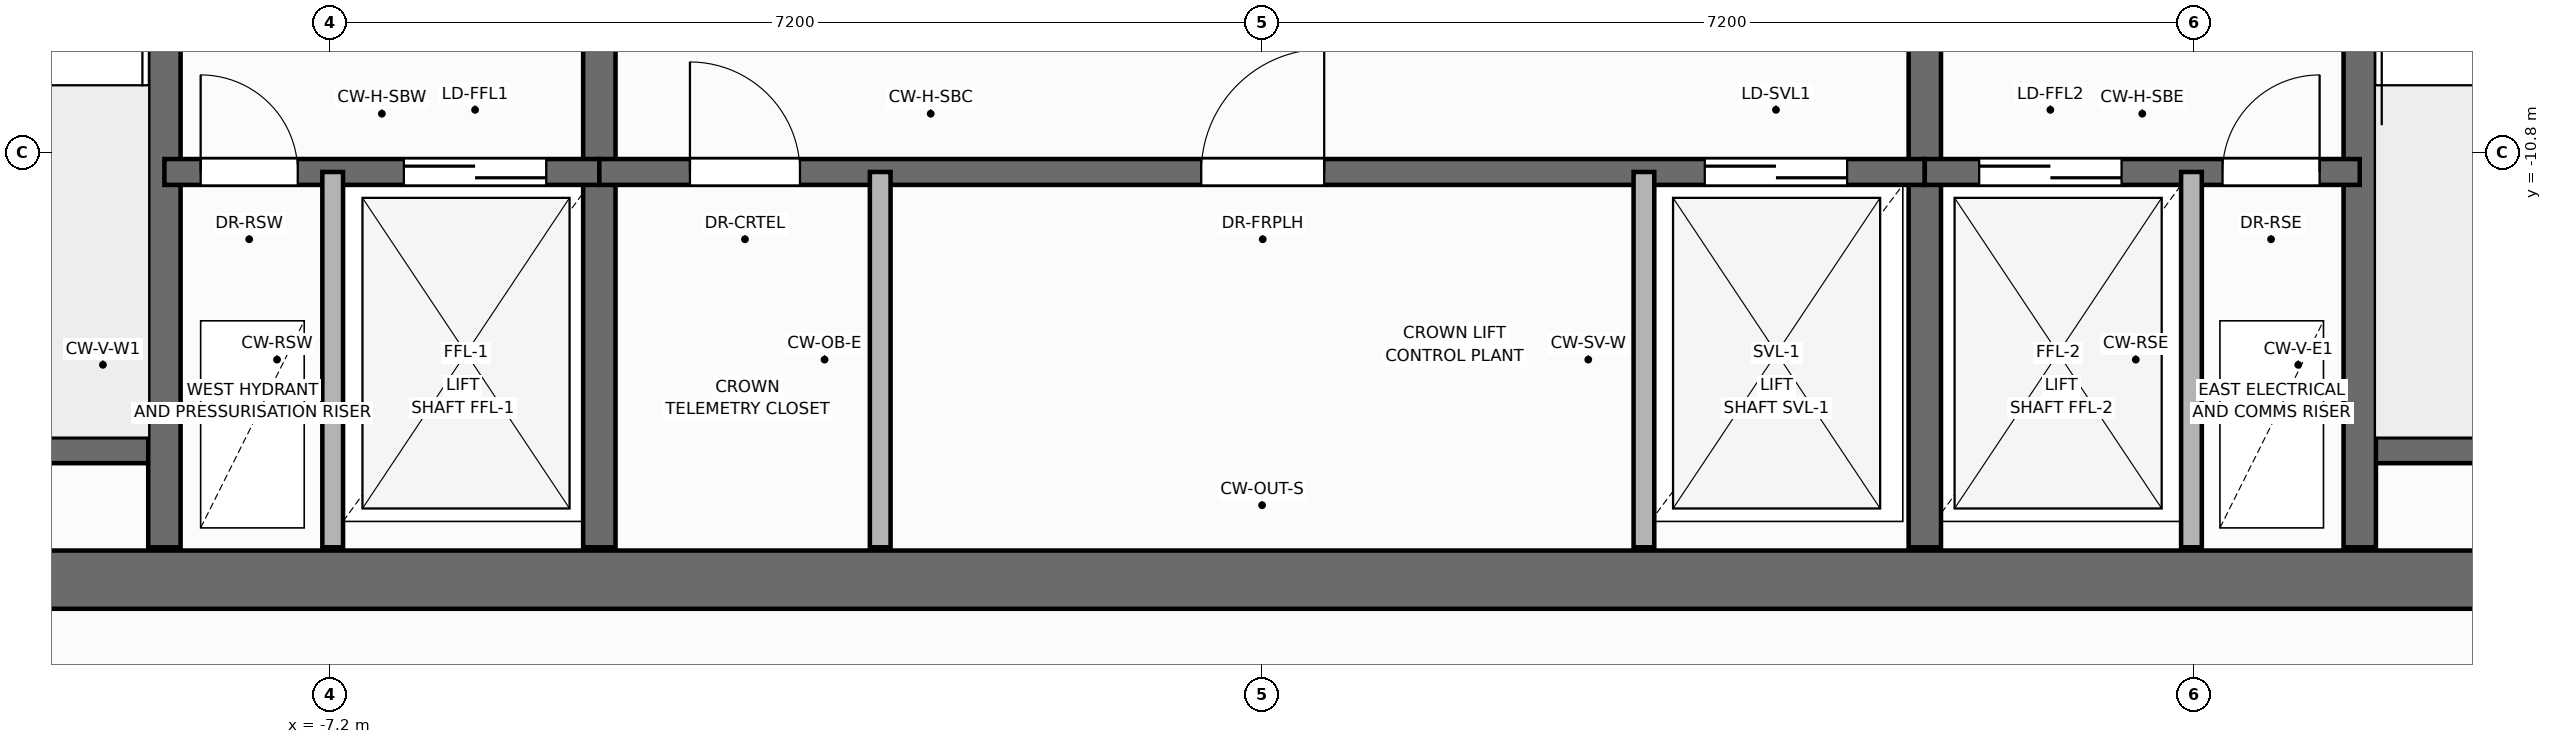
"""IFC4 building model, lengths in metres.
Left out: names, types, materials, properties, quantities, classifications, styles, units other than length and angle.
Written with IfcOpenShell. Run it as: python <this file> out.ifc"""

import sys

from ifc_helpers import new_model, si_unit, direction, frame, frame_2d, origin, place, context, subcontext, project, spatial, rectangle, extrude, element, fill, save


model = new_model("IFC4")
c1 = context("Model", 3, precision=1e-05, world=origin(), true_north=direction((0.0, 1.0)))
c2 = subcontext(c1, "Body", "Model", "MODEL_VIEW")
j1 = project(units=[si_unit("LENGTHUNIT", "METRE"), si_unit("PLANEANGLEUNIT", "RADIAN")], contexts=[c1])
p1 = place(None, origin())
s1 = spatial("IfcSite", under=j1, at=p1, CompositionType="ELEMENT")
p2 = place(p1, origin())
s2 = spatial("IfcBuilding", under=s1, at=p2, CompositionType="ELEMENT")
p3 = place(p2, frame((0.0, 0.0, 301.8)))
s3 = spatial("IfcBuildingStorey", under=s2, at=p3, CompositionType="ELEMENT", Elevation=301.8)
p4 = place(p3, frame((-12.65, -14.1, 0.0), z_axis=(0.0, 0.0, 1.0), x_axis=(1.0, 0.0, 0.0)))
e1 = element("IfcWall", 1, at=p4, inside=s3, PredefinedType="SHEAR", context=c2, shape_type="SweptSolid", body=[
    extrude(rectangle(XDim=25.3, YDim=0.45, at=frame_2d((12.65, 0.0))), origin(), (0.0, 0.0, 1.0), 4.2),
])
for number, where, z_axis, x_axis in (
    (2, (-12.35, -13.1, 0.0), (0.0, 0.0, 1.0), (1.0, 0.0, 0.0)),
    (3, (8.48, -13.1, 0.0), (0.0, 0.0, 1.0), (1.0, 0.0, 0.0)),
):
    element("IfcWall", number, at=place(p3, frame(where, z_axis=z_axis, x_axis=x_axis)), inside=s3, PredefinedType="SOLIDWALL", context=c2, shape_type="SweptSolid", body=[
        extrude(rectangle(XDim=3.87, YDim=0.2, at=frame_2d((1.935, 0.0))), origin(), (0.0, 0.0, 1.0), 4.2),
    ])
p5 = place(p3, frame((-8.48, -13.85, 0.0), z_axis=(0.0, 0.0, 1.0), x_axis=(0.0, 1.0, 0.0)))
e4 = element("IfcWall", 4, at=p5, inside=s3, PredefinedType="SHEAR", context=c2, shape_type="SweptSolid", body=[
    extrude(rectangle(XDim=9.4, YDim=0.25, at=frame_2d((4.7, 0.0))), origin(), (0.0, 0.0, 1.0), 4.2),
])
p6 = place(p5, frame((6.95, 0.0, 0.0)))
e5 = element("IfcOpeningElement", 5, at=p6, cuts=e4, PredefinedType="OPENING", context=c2, shape_type="SweptSolid", body=[
    extrude(rectangle(XDim=1.006, YDim=2.104, at=frame_2d((0.5, 1.052))), frame((0.0, 0.135, 0.0), z_axis=(0.0, -1.0, 0.0), x_axis=(1.0, 0.0, 0.0)), (0.0, 0.0, 1.0), 0.27),
])
p7 = place(p3, frame((8.48, -13.85, 0.0), z_axis=(0.0, 0.0, 1.0), x_axis=(0.0, 1.0, 0.0)))
e6 = element("IfcWall", 6, at=p7, inside=s3, PredefinedType="SHEAR", context=c2, shape_type="SweptSolid", body=[
    extrude(rectangle(XDim=9.4, YDim=0.25, at=frame_2d((4.7, 0.0))), origin(), (0.0, 0.0, 1.0), 4.2),
])
p8 = place(p7, frame((6.95, 0.0, 0.0)))
e7 = element("IfcOpeningElement", 7, at=p8, cuts=e6, PredefinedType="OPENING", context=c2, shape_type="SweptSolid", body=[
    extrude(rectangle(XDim=1.006, YDim=2.104, at=frame_2d((0.5, 1.052))), frame((0.0, 0.135, 0.0), z_axis=(0.0, -1.0, 0.0), x_axis=(1.0, 0.0, 0.0)), (0.0, 0.0, 1.0), 0.27),
])
for number, where, z_axis, x_axis in (
    (8, (-5.12, -13.85, 0.0), (0.0, 0.0, 1.0), (0.0, 1.0, 0.0)),
    (9, (5.12, -13.85, 0.0), (0.0, 0.0, 1.0), (0.0, 1.0, 0.0)),
):
    element("IfcWall", number, at=place(p3, frame(where, z_axis=z_axis, x_axis=x_axis)), inside=s3, PredefinedType="SHEAR", context=c2, shape_type="SweptSolid", body=[
        extrude(rectangle(XDim=9.4, YDim=0.25, at=frame_2d((4.7, 0.0))), origin(), (0.0, 0.0, 1.0), 4.2),
    ])
p9 = place(p3, frame((-8.48, -10.95, 0.0), z_axis=(0.0, 0.0, 1.0), x_axis=(1.0, 0.0, 0.0)))
e10 = element("IfcWall", 10, at=p9, inside=s3, PredefinedType="SOLIDWALL", context=c2, shape_type="SweptSolid", body=[
    extrude(rectangle(XDim=3.36, YDim=0.2, at=frame_2d((1.68, 0.0))), origin(), (0.0, 0.0, 1.0), 4.2),
])
p10 = place(p9, frame((0.28, 0.0, 0.0)))
e11 = element("IfcOpeningElement", 11, at=p10, cuts=e10, PredefinedType="OPENING", context=c2, shape_type="SweptSolid", body=[
    extrude(rectangle(XDim=0.756, YDim=2.054, at=frame_2d((0.375, 1.027))), frame((0.0, 0.11, 0.0), z_axis=(0.0, -1.0, 0.0), x_axis=(1.0, 0.0, 0.0)), (0.0, 0.0, 1.0), 0.22),
])
p11 = place(p9, frame((1.85, 0.0, 0.0)))
e12 = element("IfcOpeningElement", 12, at=p11, cuts=e10, PredefinedType="OPENING", context=c2, shape_type="SweptSolid", body=[
    extrude(rectangle(XDim=1.106, YDim=2.104, at=frame_2d((0.55, 1.052))), frame((0.0, 0.11, 0.0), z_axis=(0.0, -1.0, 0.0), x_axis=(1.0, 0.0, 0.0)), (0.0, 0.0, 1.0), 0.22),
])
p12 = place(p3, frame((-5.12, -10.95, 0.0), z_axis=(0.0, 0.0, 1.0), x_axis=(1.0, 0.0, 0.0)))
e13 = element("IfcWall", 13, at=p12, inside=s3, PredefinedType="SOLIDWALL", context=c2, shape_type="SweptSolid", body=[
    extrude(rectangle(XDim=10.24, YDim=0.2, at=frame_2d((5.12, 0.0))), origin(), (0.0, 0.0, 1.0), 4.2),
])
p13 = place(p12, frame((0.7, 0.0, 0.0)))
e14 = element("IfcOpeningElement", 14, at=p13, cuts=e13, PredefinedType="OPENING", context=c2, shape_type="SweptSolid", body=[
    extrude(rectangle(XDim=0.856, YDim=2.054, at=frame_2d((0.425, 1.027))), frame((0.0, 0.11, 0.0), z_axis=(0.0, -1.0, 0.0), x_axis=(1.0, 0.0, 0.0)), (0.0, 0.0, 1.0), 0.22),
])
p14 = place(p12, frame((4.65, 0.0, 0.0)))
e15 = element("IfcOpeningElement", 15, at=p14, cuts=e13, PredefinedType="OPENING", context=c2, shape_type="SweptSolid", body=[
    extrude(rectangle(XDim=0.956, YDim=2.104, at=frame_2d((0.475, 1.052))), frame((0.0, 0.11, 0.0), z_axis=(0.0, -1.0, 0.0), x_axis=(1.0, 0.0, 0.0)), (0.0, 0.0, 1.0), 0.22),
])
p15 = place(p12, frame((8.54, 0.0, 0.0)))
e16 = element("IfcOpeningElement", 16, at=p15, cuts=e13, PredefinedType="OPENING", context=c2, shape_type="SweptSolid", body=[
    extrude(rectangle(XDim=1.106, YDim=2.104, at=frame_2d((0.55, 1.052))), frame((0.0, 0.11, 0.0), z_axis=(0.0, -1.0, 0.0), x_axis=(1.0, 0.0, 0.0)), (0.0, 0.0, 1.0), 0.22),
])
p16 = place(p3, frame((5.12, -10.95, 0.0), z_axis=(0.0, 0.0, 1.0), x_axis=(1.0, 0.0, 0.0)))
e17 = element("IfcWall", 17, at=p16, inside=s3, PredefinedType="SOLIDWALL", context=c2, shape_type="SweptSolid", body=[
    extrude(rectangle(XDim=3.36, YDim=0.2, at=frame_2d((1.68, 0.0))), origin(), (0.0, 0.0, 1.0), 4.2),
])
p17 = place(p16, frame((0.42, 0.0, 0.0)))
e18 = element("IfcOpeningElement", 18, at=p17, cuts=e17, PredefinedType="OPENING", context=c2, shape_type="SweptSolid", body=[
    extrude(rectangle(XDim=1.106, YDim=2.104, at=frame_2d((0.55, 1.052))), frame((0.0, 0.11, 0.0), z_axis=(0.0, -1.0, 0.0), x_axis=(1.0, 0.0, 0.0)), (0.0, 0.0, 1.0), 0.22),
])
p18 = place(p16, frame((2.3, 0.0, 0.0)))
e19 = element("IfcOpeningElement", 19, at=p18, cuts=e17, PredefinedType="OPENING", context=c2, shape_type="SweptSolid", body=[
    extrude(rectangle(XDim=0.756, YDim=2.054, at=frame_2d((0.375, 1.027))), frame((0.0, 0.11, 0.0), z_axis=(0.0, -1.0, 0.0), x_axis=(1.0, 0.0, 0.0)), (0.0, 0.0, 1.0), 0.22),
])
for number, where, z_axis, x_axis in (
    (20, (-7.18, -13.85, 0.0), (0.0, 0.0, 1.0), (0.0, 1.0, 0.0)),
    (21, (7.18, -13.85, 0.0), (0.0, 0.0, 1.0), (0.0, 1.0, 0.0)),
    (22, (-2.95, -13.85, 0.0), (0.0, 0.0, 1.0), (0.0, 1.0, 0.0)),
    (23, (2.95, -13.85, 0.0), (0.0, 0.0, 1.0), (0.0, 1.0, 0.0)),
):
    element("IfcWall", number, at=place(p3, frame(where, z_axis=z_axis, x_axis=x_axis)), inside=s3, PredefinedType="PARTITIONING", context=c2, shape_type="SweptSolid", body=[
        extrude(rectangle(XDim=2.9, YDim=0.16, at=frame_2d((1.45, 0.0))), origin(), (0.0, 0.0, 1.0), 3.105),
    ])
p19 = place(p10, origin())
e24 = element("IfcDoor", 24, at=p19, inside=s3, OperationType="SINGLE_SWING_LEFT", PredefinedType="DOOR", context=c2, shape_type="SweptSolid", body=[
    extrude(rectangle(XDim=0.75, YDim=2.05, at=frame_2d((0.375, 1.025))), frame((0.0, 0.025, 0.0), z_axis=(0.0, -1.0, 0.0), x_axis=(1.0, 0.0, 0.0)), (0.0, 0.0, 1.0), 0.05),
])
fill(e11, e24)
p20 = place(p11, origin())
e25 = element("IfcDoor", 25, at=p20, inside=s3, OperationType="DOUBLE_DOOR_SLIDING", PredefinedType="DOOR", context=c2, shape_type="SweptSolid", body=[
    extrude(rectangle(XDim=1.1, YDim=2.1, at=frame_2d((0.55, 1.05))), frame((0.0, 0.025, 0.0), z_axis=(0.0, -1.0, 0.0), x_axis=(1.0, 0.0, 0.0)), (0.0, 0.0, 1.0), 0.05),
])
fill(e12, e25)
p21 = place(p17, origin())
e26 = element("IfcDoor", 26, at=p21, inside=s3, OperationType="DOUBLE_DOOR_SLIDING", PredefinedType="DOOR", context=c2, shape_type="SweptSolid", body=[
    extrude(rectangle(XDim=1.1, YDim=2.1, at=frame_2d((0.55, 1.05))), frame((0.0, 0.025, 0.0), z_axis=(0.0, -1.0, 0.0), x_axis=(1.0, 0.0, 0.0)), (0.0, 0.0, 1.0), 0.05),
])
fill(e18, e26)
p22 = place(p18, origin())
e27 = element("IfcDoor", 27, at=p22, inside=s3, OperationType="SINGLE_SWING_RIGHT", PredefinedType="DOOR", context=c2, shape_type="SweptSolid", body=[
    extrude(rectangle(XDim=0.75, YDim=2.05, at=frame_2d((0.375, 1.025))), frame((0.0, 0.025, 0.0), z_axis=(0.0, -1.0, 0.0), x_axis=(1.0, 0.0, 0.0)), (0.0, 0.0, 1.0), 0.05),
])
fill(e19, e27)
p23 = place(p13, origin())
e28 = element("IfcDoor", 28, at=p23, inside=s3, OperationType="SINGLE_SWING_LEFT", PredefinedType="DOOR", context=c2, shape_type="SweptSolid", body=[
    extrude(rectangle(XDim=0.85, YDim=2.05, at=frame_2d((0.425, 1.025))), frame((0.0, 0.025, 0.0), z_axis=(0.0, -1.0, 0.0), x_axis=(1.0, 0.0, 0.0)), (0.0, 0.0, 1.0), 0.05),
])
fill(e14, e28)
p24 = place(p14, origin())
e29 = element("IfcDoor", 29, at=p24, inside=s3, OperationType="SINGLE_SWING_RIGHT", PredefinedType="DOOR", context=c2, shape_type="SweptSolid", body=[
    extrude(rectangle(XDim=0.95, YDim=2.1, at=frame_2d((0.475, 1.05))), frame((0.0, 0.025, 0.0), z_axis=(0.0, -1.0, 0.0), x_axis=(1.0, 0.0, 0.0)), (0.0, 0.0, 1.0), 0.05),
])
fill(e15, e29)
p25 = place(p15, origin())
e30 = element("IfcDoor", 30, at=p25, inside=s3, OperationType="DOUBLE_DOOR_SLIDING", PredefinedType="DOOR", context=c2, shape_type="SweptSolid", body=[
    extrude(rectangle(XDim=1.1, YDim=2.1, at=frame_2d((0.55, 1.05))), frame((0.0, 0.025, 0.0), z_axis=(0.0, -1.0, 0.0), x_axis=(1.0, 0.0, 0.0)), (0.0, 0.0, 1.0), 0.05),
])
fill(e16, e30)
save(model, sys.argv[1])
